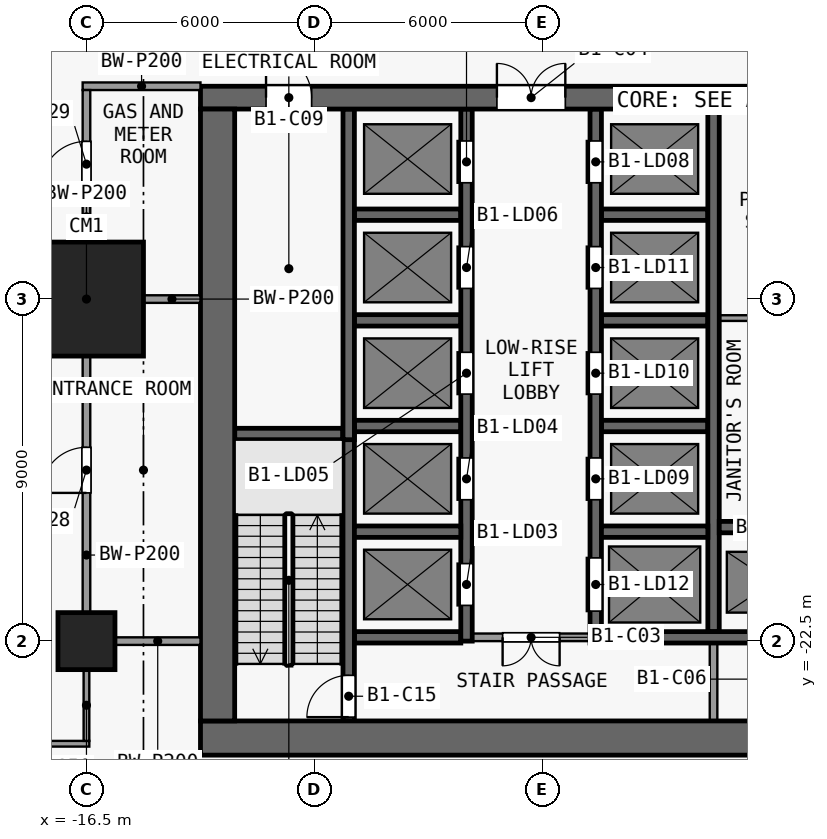
"""IFC4 building model, lengths in metres.
Left out: names, types, materials, properties, quantities, classifications, styles, units other than length and angle.
Written with IfcOpenShell. Run it as: python <this file> out.ifc"""

import sys

from ifc_helpers import new_model, si_unit, direction, frame, frame_2d, origin, origin_2d, place, context, subcontext, project, spatial, rectangle, extrude, element, fill, save


model = new_model("IFC4")
c1 = context("Model", 3, precision=1e-05, world=origin(), true_north=direction((0.0, 1.0)))
c2 = subcontext(c1, "Body", "Model", "MODEL_VIEW")
j1 = project(units=[si_unit("LENGTHUNIT", "METRE"), si_unit("PLANEANGLEUNIT", "RADIAN")], contexts=[c1])
p1 = place(None, origin())
s1 = spatial("IfcSite", under=j1, at=p1, CompositionType="ELEMENT")
p2 = place(p1, origin())
s2 = spatial("IfcBuilding", under=s1, at=p2, CompositionType="ELEMENT")
p3 = place(p2, frame((0.0, 0.0, -5.0)))
s3 = spatial("IfcBuildingStorey", under=s2, at=p3, CompositionType="ELEMENT", Elevation=-5.0)
p4 = place(p3, frame((-16.5, -22.5, 0.0), z_axis=(0.0, 0.0, 1.0), x_axis=(1.0, 0.0, 0.0)))
e1 = element("IfcColumn", 1, at=p4, inside=s3, PredefinedType="COLUMN", context=c2, shape_type="SweptSolid", body=[
    extrude(rectangle(XDim=1.5, YDim=1.5, at=origin_2d()), origin(), (0.0, 0.0, 1.0), 5.0),
])
p5 = place(p3, frame((-16.5, -13.5, 0.0), z_axis=(0.0, 0.0, 1.0), x_axis=(1.0, 0.0, 0.0)))
e2 = element("IfcColumn", 2, at=p5, inside=s3, PredefinedType="COLUMN", context=c2, shape_type="SweptSolid", body=[
    extrude(rectangle(XDim=3.0, YDim=3.0, at=origin_2d()), origin(), (0.0, 0.0, 1.0), 5.0),
])
p6 = place(p3, frame((-13.5, -25.05, 0.0), z_axis=(0.0, 0.0, 1.0), x_axis=(1.0, 0.0, 0.0)))
e3 = element("IfcWall", 3, at=p6, inside=s3, PredefinedType="SHEAR", context=c2, shape_type="SweptSolid", body=[
    extrude(rectangle(XDim=27.0, YDim=0.9, at=frame_2d((13.5, 0.0))), origin(), (0.0, 0.0, 1.0), 4.55),
])
p7 = place(p3, frame((-13.5, -8.2, 0.0), z_axis=(0.0, 0.0, 1.0), x_axis=(1.0, 0.0, 0.0)))
e4 = element("IfcWall", 4, at=p7, inside=s3, PredefinedType="SHEAR", context=c2, shape_type="SweptSolid", body=[
    extrude(rectangle(XDim=27.0, YDim=0.6, at=frame_2d((13.5, 0.0))), origin(), (0.0, 0.0, 1.0), 4.55),
])
p8 = place(p7, frame((7.8, 0.0, 0.0)))
e5 = element("IfcOpeningElement", 5, at=p8, cuts=e4, PredefinedType="OPENING", context=c2, shape_type="SweptSolid", body=[
    extrude(rectangle(XDim=1.8, YDim=2.1, at=frame_2d((0.9, 1.05))), frame((0.0, 0.31, 0.0), z_axis=(0.0, -1.0, 0.0), x_axis=(1.0, 0.0, 0.0)), (0.0, 0.0, 1.0), 0.62),
])
p9 = place(p7, frame((17.4, 0.0, 0.0)))
e6 = element("IfcOpeningElement", 6, at=p9, cuts=e4, PredefinedType="OPENING", context=c2, shape_type="SweptSolid", body=[
    extrude(rectangle(XDim=1.8, YDim=2.1, at=frame_2d((0.9, 1.05))), frame((0.0, 0.31, 0.0), z_axis=(0.0, -1.0, 0.0), x_axis=(1.0, 0.0, 0.0)), (0.0, 0.0, 1.0), 0.62),
])
p10 = place(p7, frame((1.725, 0.0, 0.0)))
e7 = element("IfcOpeningElement", 7, at=p10, cuts=e4, PredefinedType="OPENING", context=c2, shape_type="SweptSolid", body=[
    extrude(rectangle(XDim=1.2, YDim=2.1, at=frame_2d((0.6, 1.05))), frame((0.0, 0.31, 0.0), z_axis=(0.0, -1.0, 0.0), x_axis=(1.0, 0.0, 0.0)), (0.0, 0.0, 1.0), 0.62),
])
p11 = place(p7, frame((23.375, 0.0, 0.0)))
e8 = element("IfcOpeningElement", 8, at=p11, cuts=e4, PredefinedType="OPENING", context=c2, shape_type="SweptSolid", body=[
    extrude(rectangle(XDim=0.9, YDim=2.1, at=frame_2d((0.45, 1.05))), frame((0.0, 0.31, 0.0), z_axis=(0.0, -1.0, 0.0), x_axis=(1.0, 0.0, 0.0)), (0.0, 0.0, 1.0), 0.62),
])
p12 = place(p3, frame((-13.05, -24.6, 0.0), z_axis=(0.0, 0.0, 1.0), x_axis=(0.0, 1.0, 0.0)))
e9 = element("IfcWall", 9, at=p12, inside=s3, PredefinedType="SHEAR", context=c2, shape_type="SweptSolid", body=[
    extrude(rectangle(XDim=16.1, YDim=0.9, at=frame_2d((8.05, 0.0))), origin(), (0.0, 0.0, 1.0), 4.55),
])
p13 = place(p3, frame((-9.45, -22.4, 0.0), z_axis=(0.0, 0.0, 1.0), x_axis=(1.0, 0.0, 0.0)))
e10 = element("IfcWall", 10, at=p13, inside=s3, PredefinedType="SHEAR", context=c2, shape_type="SweptSolid", body=[
    extrude(rectangle(XDim=2.8, YDim=0.3, at=frame_2d((1.4, 0.0))), origin(), (0.0, 0.0, 1.0), 4.55),
])
p14 = place(p3, frame((-3.25, -22.4, 0.0), z_axis=(0.0, 0.0, 1.0), x_axis=(-1.0, 0.0, 0.0)))
e11 = element("IfcWall", 11, at=p14, inside=s3, PredefinedType="PARTITIONING", context=c2, shape_type="SweptSolid", body=[
    extrude(rectangle(XDim=3.1, YDim=0.2, at=frame_2d((1.55, 0.0))), origin(), (0.0, 0.0, 1.0), 4.55),
])
p15 = place(p14, frame((0.8, 0.0, 0.0)))
e12 = element("IfcOpeningElement", 12, at=p15, cuts=e11, PredefinedType="OPENING", context=c2, shape_type="SweptSolid", body=[
    extrude(rectangle(XDim=1.5, YDim=2.1, at=frame_2d((0.75, 1.05))), frame((0.0, 0.11, 0.0), z_axis=(0.0, -1.0, 0.0), x_axis=(1.0, 0.0, 0.0)), (0.0, 0.0, 1.0), 0.22),
])
p16 = place(p3, frame((-2.95, -22.4, 0.0), z_axis=(0.0, 0.0, 1.0), x_axis=(1.0, 0.0, 0.0)))
e13 = element("IfcWall", 13, at=p16, inside=s3, PredefinedType="SHEAR", context=c2, shape_type="SweptSolid", body=[
    extrude(rectangle(XDim=6.2, YDim=0.3, at=frame_2d((3.1, 0.0))), origin(), (0.0, 0.0, 1.0), 4.55),
])
for number, where, z_axis, x_axis in (
    (14, (-9.45, -19.62, 0.0), (0.0, 0.0, 1.0), (1.0, 0.0, 0.0)),
    (15, (-2.95, -19.62, 0.0), (0.0, 0.0, 1.0), (1.0, 0.0, 0.0)),
):
    element("IfcWall", number, at=place(p3, frame(where, z_axis=z_axis, x_axis=x_axis)), inside=s3, PredefinedType="SHEAR", context=c2, shape_type="SweptSolid", body=[
        extrude(rectangle(XDim=2.8, YDim=0.3, at=frame_2d((1.4, 0.0))), origin(), (0.0, 0.0, 1.0), 4.55),
    ])
p17 = place(p3, frame((0.15, -19.5, 0.0), z_axis=(0.0, 0.0, 1.0), x_axis=(1.0, 0.0, 0.0)))
e16 = element("IfcWall", 16, at=p17, inside=s3, PredefinedType="SHEAR", context=c2, shape_type="SweptSolid", body=[
    extrude(rectangle(XDim=3.025, YDim=0.3, at=frame_2d((1.513, 0.0))), origin(), (0.0, 0.0, 1.0), 4.55),
])
p18 = place(p3, frame((-12.6, -17.05, 0.0), z_axis=(0.0, 0.0, 1.0), x_axis=(1.0, 0.0, 0.0)))
e17 = element("IfcWall", 17, at=p18, inside=s3, PredefinedType="SHEAR", context=c2, shape_type="SweptSolid", body=[
    extrude(rectangle(XDim=2.85, YDim=0.3, at=frame_2d((1.425, 0.0))), origin(), (0.0, 0.0, 1.0), 4.55),
])
for number, where, z_axis, x_axis in (
    (18, (-9.45, -16.84, 0.0), (0.0, 0.0, 1.0), (1.0, 0.0, 0.0)),
    (19, (-2.95, -16.84, 0.0), (0.0, 0.0, 1.0), (1.0, 0.0, 0.0)),
    (20, (-9.45, -14.06, 0.0), (0.0, 0.0, 1.0), (1.0, 0.0, 0.0)),
    (21, (-2.95, -14.06, 0.0), (0.0, 0.0, 1.0), (1.0, 0.0, 0.0)),
):
    element("IfcWall", number, at=place(p3, frame(where, z_axis=z_axis, x_axis=x_axis)), inside=s3, PredefinedType="SHEAR", context=c2, shape_type="SweptSolid", body=[
        extrude(rectangle(XDim=2.8, YDim=0.3, at=frame_2d((1.4, 0.0))), origin(), (0.0, 0.0, 1.0), 4.55),
    ])
p19 = place(p3, frame((0.15, -14.0, 0.0), z_axis=(0.0, 0.0, 1.0), x_axis=(1.0, 0.0, 0.0)))
e22 = element("IfcWall", 22, at=p19, inside=s3, PredefinedType="PARTITIONING", context=c2, shape_type="SweptSolid", body=[
    extrude(rectangle(XDim=2.875, YDim=0.15, at=frame_2d((1.438, 0.0))), origin(), (0.0, 0.0, 1.0), 4.55),
])
for number, where, z_axis, x_axis in (
    (23, (-9.45, -11.28, 0.0), (0.0, 0.0, 1.0), (1.0, 0.0, 0.0)),
    (24, (-2.95, -11.28, 0.0), (0.0, 0.0, 1.0), (1.0, 0.0, 0.0)),
):
    element("IfcWall", number, at=place(p3, frame(where, z_axis=z_axis, x_axis=x_axis)), inside=s3, PredefinedType="SHEAR", context=c2, shape_type="SweptSolid", body=[
        extrude(rectangle(XDim=2.8, YDim=0.3, at=frame_2d((1.4, 0.0))), origin(), (0.0, 0.0, 1.0), 4.55),
    ])
p20 = place(p3, frame((-9.6, -24.6, 0.0), z_axis=(0.0, 0.0, 1.0), x_axis=(0.0, 1.0, 0.0)))
e25 = element("IfcWall", 25, at=p20, inside=s3, PredefinedType="SHEAR", context=c2, shape_type="SweptSolid", body=[
    extrude(rectangle(XDim=7.7, YDim=0.3, at=frame_2d((3.85, 0.0))), origin(), (0.0, 0.0, 1.0), 4.55),
])
p21 = place(p20, frame((0.1, 0.0, 0.0)))
e26 = element("IfcOpeningElement", 26, at=p21, cuts=e25, PredefinedType="OPENING", context=c2, shape_type="SweptSolid", body=[
    extrude(rectangle(XDim=1.1, YDim=2.1, at=frame_2d((0.55, 1.05))), frame((0.0, 0.16, 0.0), z_axis=(0.0, -1.0, 0.0), x_axis=(1.0, 0.0, 0.0)), (0.0, 0.0, 1.0), 0.32),
])
p22 = place(p3, frame((-9.6, -17.2, 0.0), z_axis=(0.0, 0.0, 1.0), x_axis=(0.0, 1.0, 0.0)))
e27 = element("IfcWall", 27, at=p22, inside=s3, PredefinedType="SHEAR", context=c2, shape_type="SweptSolid", body=[
    extrude(rectangle(XDim=8.7, YDim=0.3, at=frame_2d((4.35, 0.0))), origin(), (0.0, 0.0, 1.0), 4.55),
])
p23 = place(p3, frame((-6.5, -22.5, 0.0), z_axis=(0.0, 0.0, 1.0), x_axis=(0.0, 1.0, 0.0)))
e28 = element("IfcWall", 28, at=p23, inside=s3, PredefinedType="SHEAR", context=c2, shape_type="SweptSolid", body=[
    extrude(rectangle(XDim=14.0, YDim=0.3, at=frame_2d((7.0, 0.0))), origin(), (0.0, 0.0, 1.0), 4.55),
])
p24 = place(p23, frame((0.94, 0.0, 0.0)))
e29 = element("IfcOpeningElement", 29, at=p24, cuts=e28, PredefinedType="OPENING", context=c2, shape_type="SweptSolid", body=[
    extrude(rectangle(XDim=1.1, YDim=2.1, at=frame_2d((0.55, 1.05))), frame((0.0, 0.16, 0.0), z_axis=(0.0, -1.0, 0.0), x_axis=(1.0, 0.0, 0.0)), (0.0, 0.0, 1.0), 0.32),
])
p25 = place(p23, frame((3.72, 0.0, 0.0)))
e30 = element("IfcOpeningElement", 30, at=p25, cuts=e28, PredefinedType="OPENING", context=c2, shape_type="SweptSolid", body=[
    extrude(rectangle(XDim=1.1, YDim=2.1, at=frame_2d((0.55, 1.05))), frame((0.0, 0.16, 0.0), z_axis=(0.0, -1.0, 0.0), x_axis=(1.0, 0.0, 0.0)), (0.0, 0.0, 1.0), 0.32),
])
p26 = place(p23, frame((6.5, 0.0, 0.0)))
e31 = element("IfcOpeningElement", 31, at=p26, cuts=e28, PredefinedType="OPENING", context=c2, shape_type="SweptSolid", body=[
    extrude(rectangle(XDim=1.1, YDim=2.1, at=frame_2d((0.55, 1.05))), frame((0.0, 0.16, 0.0), z_axis=(0.0, -1.0, 0.0), x_axis=(1.0, 0.0, 0.0)), (0.0, 0.0, 1.0), 0.32),
])
p27 = place(p23, frame((9.28, 0.0, 0.0)))
e32 = element("IfcOpeningElement", 32, at=p27, cuts=e28, PredefinedType="OPENING", context=c2, shape_type="SweptSolid", body=[
    extrude(rectangle(XDim=1.1, YDim=2.1, at=frame_2d((0.55, 1.05))), frame((0.0, 0.16, 0.0), z_axis=(0.0, -1.0, 0.0), x_axis=(1.0, 0.0, 0.0)), (0.0, 0.0, 1.0), 0.32),
])
p28 = place(p23, frame((12.06, 0.0, 0.0)))
e33 = element("IfcOpeningElement", 33, at=p28, cuts=e28, PredefinedType="OPENING", context=c2, shape_type="SweptSolid", body=[
    extrude(rectangle(XDim=1.1, YDim=2.1, at=frame_2d((0.55, 1.05))), frame((0.0, 0.16, 0.0), z_axis=(0.0, -1.0, 0.0), x_axis=(1.0, 0.0, 0.0)), (0.0, 0.0, 1.0), 0.32),
])
p29 = place(p3, frame((-3.1, -22.55, 0.0), z_axis=(0.0, 0.0, 1.0), x_axis=(0.0, 1.0, 0.0)))
e34 = element("IfcWall", 34, at=p29, inside=s3, PredefinedType="SHEAR", context=c2, shape_type="SweptSolid", body=[
    extrude(rectangle(XDim=14.05, YDim=0.3, at=frame_2d((7.025, 0.0))), origin(), (0.0, 0.0, 1.0), 4.55),
])
p30 = place(p29, frame((12.11, 0.0, 0.0)))
e35 = element("IfcOpeningElement", 35, at=p30, cuts=e34, PredefinedType="OPENING", context=c2, shape_type="SweptSolid", body=[
    extrude(rectangle(XDim=1.1, YDim=2.1, at=frame_2d((0.55, 1.05))), frame((0.0, 0.16, 0.0), z_axis=(0.0, -1.0, 0.0), x_axis=(1.0, 0.0, 0.0)), (0.0, 0.0, 1.0), 0.32),
])
p31 = place(p29, frame((3.77, 0.0, 0.0)))
e36 = element("IfcOpeningElement", 36, at=p31, cuts=e34, PredefinedType="OPENING", context=c2, shape_type="SweptSolid", body=[
    extrude(rectangle(XDim=1.1, YDim=2.1, at=frame_2d((0.55, 1.05))), frame((0.0, 0.16, 0.0), z_axis=(0.0, -1.0, 0.0), x_axis=(1.0, 0.0, 0.0)), (0.0, 0.0, 1.0), 0.32),
])
p32 = place(p29, frame((6.55, 0.0, 0.0)))
e37 = element("IfcOpeningElement", 37, at=p32, cuts=e34, PredefinedType="OPENING", context=c2, shape_type="SweptSolid", body=[
    extrude(rectangle(XDim=1.1, YDim=2.1, at=frame_2d((0.55, 1.05))), frame((0.0, 0.16, 0.0), z_axis=(0.0, -1.0, 0.0), x_axis=(1.0, 0.0, 0.0)), (0.0, 0.0, 1.0), 0.32),
])
p33 = place(p29, frame((9.33, 0.0, 0.0)))
e38 = element("IfcOpeningElement", 38, at=p33, cuts=e34, PredefinedType="OPENING", context=c2, shape_type="SweptSolid", body=[
    extrude(rectangle(XDim=1.1, YDim=2.1, at=frame_2d((0.55, 1.05))), frame((0.0, 0.16, 0.0), z_axis=(0.0, -1.0, 0.0), x_axis=(1.0, 0.0, 0.0)), (0.0, 0.0, 1.0), 0.32),
])
p34 = place(p29, frame((0.84, 0.0, 0.0)))
e39 = element("IfcOpeningElement", 39, at=p34, cuts=e34, PredefinedType="OPENING", context=c2, shape_type="SweptSolid", body=[
    extrude(rectangle(XDim=1.4, YDim=2.1, at=frame_2d((0.7, 1.05))), frame((0.0, 0.16, 0.0), z_axis=(0.0, -1.0, 0.0), x_axis=(1.0, 0.0, 0.0)), (0.0, 0.0, 1.0), 0.32),
])
p35 = place(p3, frame((0.0, -24.6, 0.0), z_axis=(0.0, 0.0, 1.0), x_axis=(0.0, 1.0, 0.0)))
e40 = element("IfcWall", 40, at=p35, inside=s3, PredefinedType="PARTITIONING", context=c2, shape_type="SweptSolid", body=[
    extrude(rectangle(XDim=2.05, YDim=0.2, at=frame_2d((1.025, 0.0))), origin(), (0.0, 0.0, 1.0), 4.55),
])
p36 = place(p3, frame((0.0, -22.25, 0.0), z_axis=(0.0, 0.0, 1.0), x_axis=(0.0, 1.0, 0.0)))
e41 = element("IfcWall", 41, at=p36, inside=s3, PredefinedType="SHEAR", context=c2, shape_type="SweptSolid", body=[
    extrude(rectangle(XDim=13.75, YDim=0.3, at=frame_2d((6.875, 0.0))), origin(), (0.0, 0.0, 1.0), 4.55),
])
p37 = place(p3, frame((-22.575, -25.2, 0.0), z_axis=(0.0, 0.0, 1.0), x_axis=(1.0, 0.0, 0.0)))
e42 = element("IfcWall", 42, at=p37, inside=s3, PredefinedType="PARTITIONING", context=c2, shape_type="SweptSolid", body=[
    extrude(rectangle(XDim=6.15, YDim=0.15, at=frame_2d((3.075, 0.0))), origin(), (0.0, 0.0, 1.0), 4.55),
])
p38 = place(p3, frame((-15.75, -22.5, 0.0), z_axis=(0.0, 0.0, 1.0), x_axis=(1.0, 0.0, 0.0)))
e43 = element("IfcWall", 43, at=p38, inside=s3, PredefinedType="SOLIDWALL", context=c2, shape_type="SweptSolid", body=[
    extrude(rectangle(XDim=2.25, YDim=0.2, at=frame_2d((1.125, 0.0))), origin(), (0.0, 0.0, 1.0), 4.55),
])
p39 = place(p3, frame((-15.0, -13.5, 0.0), z_axis=(0.0, 0.0, 1.0), x_axis=(1.0, 0.0, 0.0)))
e44 = element("IfcWall", 44, at=p39, inside=s3, PredefinedType="SOLIDWALL", context=c2, shape_type="SweptSolid", body=[
    extrude(rectangle(XDim=1.5, YDim=0.2, at=frame_2d((0.75, 0.0))), origin(), (0.0, 0.0, 1.0), 4.55),
])
p40 = place(p3, frame((-16.6, -7.9, 0.0), z_axis=(0.0, 0.0, 1.0), x_axis=(1.0, 0.0, 0.0)))
e45 = element("IfcWall", 45, at=p40, inside=s3, PredefinedType="SOLIDWALL", context=c2, shape_type="SweptSolid", body=[
    extrude(rectangle(XDim=3.1, YDim=0.2, at=frame_2d((1.55, 0.0))), origin(), (0.0, 0.0, 1.0), 4.55),
])
p41 = place(p3, frame((-16.5, -25.125, 0.0), z_axis=(0.0, 0.0, 1.0), x_axis=(0.0, 1.0, 0.0)))
e46 = element("IfcWall", 46, at=p41, inside=s3, PredefinedType="PARTITIONING", context=c2, shape_type="SweptSolid", body=[
    extrude(rectangle(XDim=1.875, YDim=0.15, at=frame_2d((0.938, 0.0))), origin(), (0.0, 0.0, 1.0), 4.55),
])
p42 = place(p3, frame((-16.5, -21.75, 0.0), z_axis=(0.0, 0.0, 1.0), x_axis=(0.0, 1.0, 0.0)))
e47 = element("IfcWall", 47, at=p42, inside=s3, PredefinedType="SOLIDWALL", context=c2, shape_type="SweptSolid", body=[
    extrude(rectangle(XDim=6.75, YDim=0.2, at=frame_2d((3.375, 0.0))), origin(), (0.0, 0.0, 1.0), 4.55),
])
p43 = place(p42, frame((3.15, 0.0, 0.0)))
e48 = element("IfcOpeningElement", 48, at=p43, cuts=e47, PredefinedType="OPENING", context=c2, shape_type="SweptSolid", body=[
    extrude(rectangle(XDim=1.2, YDim=2.1, at=frame_2d((0.6, 1.05))), frame((0.0, 0.11, 0.0), z_axis=(0.0, -1.0, 0.0), x_axis=(1.0, 0.0, 0.0)), (0.0, 0.0, 1.0), 0.22),
])
p44 = place(p3, frame((-16.5, -12.0, 0.0), z_axis=(0.0, 0.0, 1.0), x_axis=(0.0, 1.0, 0.0)))
e49 = element("IfcWall", 49, at=p44, inside=s3, PredefinedType="SOLIDWALL", context=c2, shape_type="SweptSolid", body=[
    extrude(rectangle(XDim=4.0, YDim=0.2, at=frame_2d((2.0, 0.0))), origin(), (0.0, 0.0, 1.0), 4.55),
])
p45 = place(p44, frame((1.45, 0.0, 0.0)))
e50 = element("IfcOpeningElement", 50, at=p45, cuts=e49, PredefinedType="OPENING", context=c2, shape_type="SweptSolid", body=[
    extrude(rectangle(XDim=1.2, YDim=2.1, at=frame_2d((0.6, 1.05))), frame((0.0, 0.11, 0.0), z_axis=(0.0, -1.0, 0.0), x_axis=(1.0, 0.0, 0.0)), (0.0, 0.0, 1.0), 0.22),
])
p46 = place(p24, origin())
e51 = element("IfcDoor", 51, at=p46, inside=s3, OperationType="DOUBLE_DOOR_SLIDING", PredefinedType="DOOR", context=c2, shape_type="SweptSolid", body=[
    extrude(rectangle(XDim=1.1, YDim=2.1, at=frame_2d((0.55, 1.05))), frame((0.0, 0.025, 0.0), z_axis=(0.0, -1.0, 0.0), x_axis=(1.0, 0.0, 0.0)), (0.0, 0.0, 1.0), 0.05),
])
fill(e29, e51)
p47 = place(p25, origin())
e52 = element("IfcDoor", 52, at=p47, inside=s3, OperationType="DOUBLE_DOOR_SLIDING", PredefinedType="DOOR", context=c2, shape_type="SweptSolid", body=[
    extrude(rectangle(XDim=1.1, YDim=2.1, at=frame_2d((0.55, 1.05))), frame((0.0, 0.025, 0.0), z_axis=(0.0, -1.0, 0.0), x_axis=(1.0, 0.0, 0.0)), (0.0, 0.0, 1.0), 0.05),
])
fill(e30, e52)
p48 = place(p26, origin())
e53 = element("IfcDoor", 53, at=p48, inside=s3, OperationType="DOUBLE_DOOR_SLIDING", PredefinedType="DOOR", context=c2, shape_type="SweptSolid", body=[
    extrude(rectangle(XDim=1.1, YDim=2.1, at=frame_2d((0.55, 1.05))), frame((0.0, 0.025, 0.0), z_axis=(0.0, -1.0, 0.0), x_axis=(1.0, 0.0, 0.0)), (0.0, 0.0, 1.0), 0.05),
])
fill(e31, e53)
p49 = place(p27, origin())
e54 = element("IfcDoor", 54, at=p49, inside=s3, OperationType="DOUBLE_DOOR_SLIDING", PredefinedType="DOOR", context=c2, shape_type="SweptSolid", body=[
    extrude(rectangle(XDim=1.1, YDim=2.1, at=frame_2d((0.55, 1.05))), frame((0.0, 0.025, 0.0), z_axis=(0.0, -1.0, 0.0), x_axis=(1.0, 0.0, 0.0)), (0.0, 0.0, 1.0), 0.05),
])
fill(e32, e54)
p50 = place(p28, origin())
e55 = element("IfcDoor", 55, at=p50, inside=s3, OperationType="DOUBLE_DOOR_SLIDING", PredefinedType="DOOR", context=c2, shape_type="SweptSolid", body=[
    extrude(rectangle(XDim=1.1, YDim=2.1, at=frame_2d((0.55, 1.05))), frame((0.0, 0.025, 0.0), z_axis=(0.0, -1.0, 0.0), x_axis=(1.0, 0.0, 0.0)), (0.0, 0.0, 1.0), 0.05),
])
fill(e33, e55)
p51 = place(p30, origin())
e56 = element("IfcDoor", 56, at=p51, inside=s3, OperationType="DOUBLE_DOOR_SLIDING", PredefinedType="DOOR", context=c2, shape_type="SweptSolid", body=[
    extrude(rectangle(XDim=1.1, YDim=2.1, at=frame_2d((0.55, 1.05))), frame((0.0, 0.025, 0.0), z_axis=(0.0, -1.0, 0.0), x_axis=(1.0, 0.0, 0.0)), (0.0, 0.0, 1.0), 0.05),
])
fill(e35, e56)
p52 = place(p31, origin())
e57 = element("IfcDoor", 57, at=p52, inside=s3, OperationType="DOUBLE_DOOR_SLIDING", PredefinedType="DOOR", context=c2, shape_type="SweptSolid", body=[
    extrude(rectangle(XDim=1.1, YDim=2.1, at=frame_2d((0.55, 1.05))), frame((0.0, 0.025, 0.0), z_axis=(0.0, -1.0, 0.0), x_axis=(1.0, 0.0, 0.0)), (0.0, 0.0, 1.0), 0.05),
])
fill(e36, e57)
p53 = place(p32, origin())
e58 = element("IfcDoor", 58, at=p53, inside=s3, OperationType="DOUBLE_DOOR_SLIDING", PredefinedType="DOOR", context=c2, shape_type="SweptSolid", body=[
    extrude(rectangle(XDim=1.1, YDim=2.1, at=frame_2d((0.55, 1.05))), frame((0.0, 0.025, 0.0), z_axis=(0.0, -1.0, 0.0), x_axis=(1.0, 0.0, 0.0)), (0.0, 0.0, 1.0), 0.05),
])
fill(e37, e58)
p54 = place(p33, origin())
e59 = element("IfcDoor", 59, at=p54, inside=s3, OperationType="DOUBLE_DOOR_SLIDING", PredefinedType="DOOR", context=c2, shape_type="SweptSolid", body=[
    extrude(rectangle(XDim=1.1, YDim=2.1, at=frame_2d((0.55, 1.05))), frame((0.0, 0.025, 0.0), z_axis=(0.0, -1.0, 0.0), x_axis=(1.0, 0.0, 0.0)), (0.0, 0.0, 1.0), 0.05),
])
fill(e38, e59)
p55 = place(p34, origin())
e60 = element("IfcDoor", 60, at=p55, inside=s3, OperationType="DOUBLE_DOOR_SLIDING", PredefinedType="DOOR", context=c2, shape_type="SweptSolid", body=[
    extrude(rectangle(XDim=1.4, YDim=2.1, at=frame_2d((0.7, 1.05))), frame((0.0, 0.025, 0.0), z_axis=(0.0, -1.0, 0.0), x_axis=(1.0, 0.0, 0.0)), (0.0, 0.0, 1.0), 0.05),
])
fill(e39, e60)
p56 = place(p15, origin())
e61 = element("IfcDoor", 61, at=p56, inside=s3, OperationType="DOUBLE_DOOR_SINGLE_SWING", PredefinedType="DOOR", context=c2, shape_type="SweptSolid", body=[
    extrude(rectangle(XDim=1.5, YDim=2.1, at=frame_2d((0.75, 1.05))), frame((0.0, 0.025, 0.0), z_axis=(0.0, -1.0, 0.0), x_axis=(1.0, 0.0, 0.0)), (0.0, 0.0, 1.0), 0.05),
])
fill(e12, e61)
p57 = place(p8, origin())
e62 = element("IfcDoor", 62, at=p57, inside=s3, OperationType="DOUBLE_DOOR_SINGLE_SWING", PredefinedType="DOOR", context=c2, shape_type="SweptSolid", body=[
    extrude(rectangle(XDim=1.8, YDim=2.1, at=frame_2d((0.9, 1.05))), frame((0.0, 0.025, 0.0), z_axis=(0.0, -1.0, 0.0), x_axis=(1.0, 0.0, 0.0)), (0.0, 0.0, 1.0), 0.05),
])
fill(e5, e62)
p58 = place(p10, origin())
e63 = element("IfcDoor", 63, at=p58, inside=s3, OperationType="SINGLE_SWING_LEFT", PredefinedType="DOOR", context=c2, shape_type="SweptSolid", body=[
    extrude(rectangle(XDim=1.2, YDim=2.1, at=frame_2d((0.6, 1.05))), frame((0.0, 0.025, 0.0), z_axis=(0.0, -1.0, 0.0), x_axis=(1.0, 0.0, 0.0)), (0.0, 0.0, 1.0), 0.05),
])
fill(e7, e63)
p59 = place(p21, origin())
e64 = element("IfcDoor", 64, at=p59, inside=s3, OperationType="SINGLE_SWING_LEFT", PredefinedType="DOOR", context=c2, shape_type="SweptSolid", body=[
    extrude(rectangle(XDim=1.1, YDim=2.1, at=frame_2d((0.55, 1.05))), frame((0.0, 0.025, 0.0), z_axis=(0.0, -1.0, 0.0), x_axis=(1.0, 0.0, 0.0)), (0.0, 0.0, 1.0), 0.05),
])
fill(e26, e64)
p60 = place(p43, origin())
e65 = element("IfcDoor", 65, at=p60, inside=s3, OperationType="SINGLE_SWING_LEFT", PredefinedType="DOOR", context=c2, shape_type="SweptSolid", body=[
    extrude(rectangle(XDim=1.2, YDim=2.1, at=frame_2d((0.6, 1.05))), frame((0.0, 0.025, 0.0), z_axis=(0.0, -1.0, 0.0), x_axis=(1.0, 0.0, 0.0)), (0.0, 0.0, 1.0), 0.05),
])
fill(e48, e65)
p61 = place(p45, origin())
e66 = element("IfcDoor", 66, at=p61, inside=s3, OperationType="SINGLE_SWING_LEFT", PredefinedType="DOOR", context=c2, shape_type="SweptSolid", body=[
    extrude(rectangle(XDim=1.2, YDim=2.1, at=frame_2d((0.6, 1.05))), frame((0.0, 0.025, 0.0), z_axis=(0.0, -1.0, 0.0), x_axis=(1.0, 0.0, 0.0)), (0.0, 0.0, 1.0), 0.05),
])
fill(e50, e66)
save(model, sys.argv[1])
